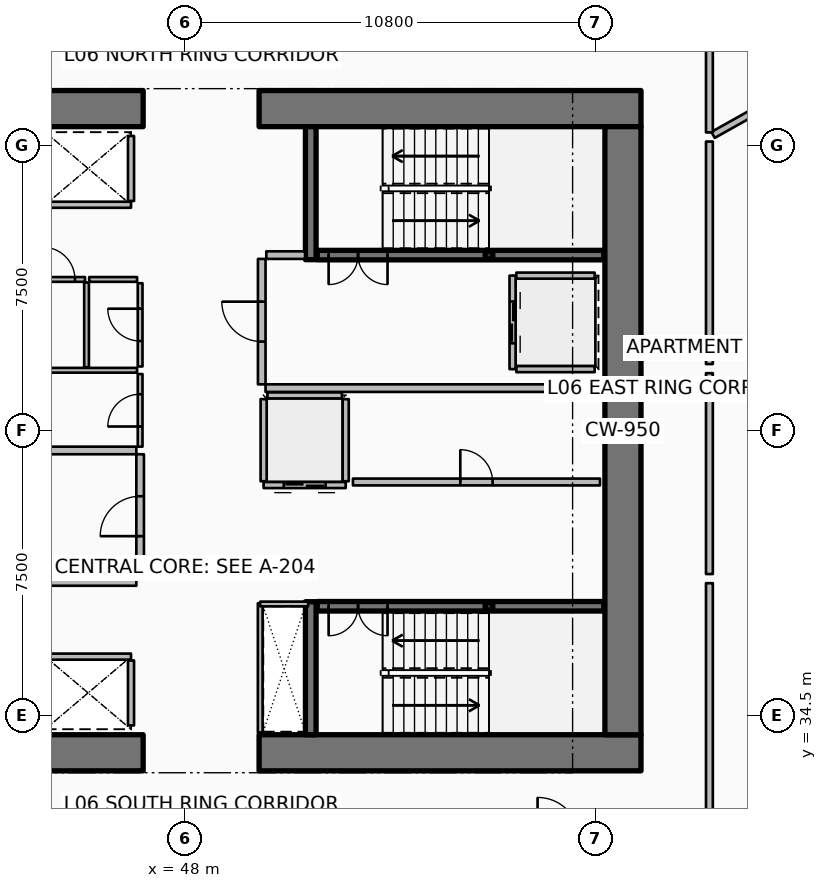
"""IFC4 building model, lengths in metres.
Left out: names, types, materials, properties, quantities, classifications, styles, units other than length and angle.
Written with IfcOpenShell. Run it as: python <this file> out.ifc"""

import sys

from ifc_helpers import new_model, si_unit, direction, frame, frame_2d, origin, origin_2d, place, context, subcontext, project, spatial, rectangle, hollow_rectangle, extrude, element, fill, save


model = new_model("IFC4")
c1 = context("Model", 3, precision=1e-05, world=origin(), true_north=direction((0.0, 1.0)))
c2 = subcontext(c1, "Body", "Model", "MODEL_VIEW")
j1 = project(units=[si_unit("LENGTHUNIT", "METRE"), si_unit("PLANEANGLEUNIT", "RADIAN")], contexts=[c1])
p1 = place(None, origin())
s1 = spatial("IfcSite", under=j1, at=p1, CompositionType="ELEMENT")
p2 = place(p1, origin())
s2 = spatial("IfcBuilding", under=s1, at=p2, CompositionType="ELEMENT")
p3 = place(p2, frame((0.0, 0.0, 30.15)))
s3 = spatial("IfcBuildingStorey", under=s2, at=p3, CompositionType="ELEMENT", Elevation=30.15)
p4 = place(p3, frame((36.85, 33.525, 0.0), z_axis=(0.0, 0.0, 1.0), x_axis=(1.0, 0.0, 0.0)))
e1 = element("IfcWall", 1, at=p4, inside=s3, PredefinedType="SHEAR", context=c2, shape_type="SweptSolid", body=[
    extrude(rectangle(XDim=10.05, YDim=0.95, at=frame_2d((5.025, 0.0))), origin(), (0.0, 0.0, 1.0), 3.75),
])
p5 = place(p3, frame((49.95, 33.525, 0.0), z_axis=(0.0, 0.0, 1.0), x_axis=(1.0, 0.0, 0.0)))
e2 = element("IfcWall", 2, at=p5, inside=s3, PredefinedType="SHEAR", context=c2, shape_type="SweptSolid", body=[
    extrude(rectangle(XDim=10.05, YDim=0.95, at=frame_2d((5.025, 0.0))), origin(), (0.0, 0.0, 1.0), 3.75),
])
p6 = place(p3, frame((36.85, 50.475, 0.0), z_axis=(0.0, 0.0, 1.0), x_axis=(1.0, 0.0, 0.0)))
e3 = element("IfcWall", 3, at=p6, inside=s3, PredefinedType="SHEAR", context=c2, shape_type="SweptSolid", body=[
    extrude(rectangle(XDim=10.05, YDim=0.95, at=frame_2d((5.025, 0.0))), origin(), (0.0, 0.0, 1.0), 3.75),
])
p7 = place(p3, frame((49.95, 50.475, 0.0), z_axis=(0.0, 0.0, 1.0), x_axis=(1.0, 0.0, 0.0)))
e4 = element("IfcWall", 4, at=p7, inside=s3, PredefinedType="SHEAR", context=c2, shape_type="SweptSolid", body=[
    extrude(rectangle(XDim=10.05, YDim=0.95, at=frame_2d((5.025, 0.0))), origin(), (0.0, 0.0, 1.0), 3.75),
])
p8 = place(p3, frame((59.525, 34.0, 0.0), z_axis=(0.0, 0.0, 1.0), x_axis=(0.0, 1.0, 0.0)))
e5 = element("IfcWall", 5, at=p8, inside=s3, PredefinedType="SHEAR", context=c2, shape_type="SweptSolid", body=[
    extrude(rectangle(XDim=16.0, YDim=0.95, at=frame_2d((8.0, 0.0))), origin(), (0.0, 0.0, 1.0), 3.75),
])
for number, where, z_axis, x_axis in (
    (6, (51.31, 46.5, 0.0), (0.0, 0.0, 1.0), (0.0, 1.0, 0.0)),
    (7, (51.31, 34.0, 0.0), (0.0, 0.0, 1.0), (0.0, 1.0, 0.0)),
):
    element("IfcWall", number, at=place(p3, frame(where, z_axis=z_axis, x_axis=x_axis)), inside=s3, PredefinedType="SHEAR", context=c2, shape_type="SweptSolid", body=[
        extrude(rectangle(XDim=3.5, YDim=0.28, at=frame_2d((1.75, 0.0))), origin(), (0.0, 0.0, 1.0), 3.75),
    ])
for number, where, z_axis, x_axis in (
    (8, (56.0, 46.62, 0.0), (0.0, 0.0, 1.0), (1.0, 0.0, 0.0)),
    (9, (56.0, 37.38, 0.0), (0.0, 0.0, 1.0), (1.0, 0.0, 0.0)),
):
    element("IfcColumn", number, at=place(p3, frame(where, z_axis=z_axis, x_axis=x_axis)), inside=s3, PredefinedType="COLUMN", context=c2, shape_type="SweptSolid", body=[
        extrude(hollow_rectangle(XDim=0.2, YDim=0.2, WallThickness=0.01, InnerFilletRadius=0.01, OuterFilletRadius=0.02, at=origin_2d()), origin(), (0.0, 0.0, 1.0), 1.67),
    ])
p9 = place(p3, frame((51.48, 46.62, 0.0), z_axis=(0.0, 0.0, 1.0), x_axis=(1.0, 0.0, 0.0)))
e10 = element("IfcWall", 10, at=p9, inside=s3, PredefinedType="SOLIDWALL", context=c2, shape_type="SweptSolid", body=[
    extrude(rectangle(XDim=7.54, YDim=0.25, at=frame_2d((3.77, 0.0))), origin(), (0.0, 0.0, 1.0), 3.5),
])
p10 = place(p9, frame((0.3, 0.0, 0.0)))
e11 = element("IfcOpeningElement", 11, at=p10, cuts=e10, PredefinedType="OPENING", context=c2, shape_type="SweptSolid", body=[
    extrude(rectangle(XDim=1.55, YDim=2.15, at=frame_2d((0.775, 1.075))), frame((0.0, 0.135, 0.0), z_axis=(0.0, -1.0, 0.0), x_axis=(1.0, 0.0, 0.0)), (0.0, 0.0, 1.0), 0.27),
])
p11 = place(p3, frame((51.48, 37.38, 0.0), z_axis=(0.0, 0.0, 1.0), x_axis=(1.0, 0.0, 0.0)))
e12 = element("IfcWall", 12, at=p11, inside=s3, PredefinedType="SOLIDWALL", context=c2, shape_type="SweptSolid", body=[
    extrude(rectangle(XDim=7.54, YDim=0.25, at=frame_2d((3.77, 0.0))), origin(), (0.0, 0.0, 1.0), 3.5),
])
p12 = place(p11, frame((0.3, 0.0, 0.0)))
e13 = element("IfcOpeningElement", 13, at=p12, cuts=e12, PredefinedType="OPENING", context=c2, shape_type="SweptSolid", body=[
    extrude(rectangle(XDim=1.55, YDim=2.15, at=frame_2d((0.775, 1.075))), frame((0.0, 0.135, 0.0), z_axis=(0.0, -1.0, 0.0), x_axis=(1.0, 0.0, 0.0)), (0.0, 0.0, 1.0), 0.27),
])
p13 = place(p3, frame((46.58, 47.945, 0.0), z_axis=(0.0, 0.0, 1.0), x_axis=(-1.0, 0.0, 0.0)))
e14 = element("IfcWall", 14, at=p13, inside=s3, PredefinedType="PARTITIONING", context=c2, shape_type="SweptSolid", body=[
    extrude(rectangle(XDim=2.26, YDim=0.16, at=frame_2d((1.13, 0.0))), origin(), (0.0, 0.0, 1.0), 3.5),
])
p14 = place(p3, frame((46.58, 48.045, 0.0), z_axis=(0.0, 0.0, 1.0), x_axis=(0.0, 1.0, 0.0)))
e15 = element("IfcWall", 15, at=p14, inside=s3, PredefinedType="PARTITIONING", context=c2, shape_type="SweptSolid", body=[
    extrude(rectangle(XDim=1.71, YDim=0.16, at=frame_2d((0.855, 0.0))), origin(), (0.0, 0.0, 1.0), 3.5),
])
p15 = place(p3, frame((44.32, 36.055, 0.0), z_axis=(0.0, 0.0, 1.0), x_axis=(1.0, 0.0, 0.0)))
e16 = element("IfcWall", 16, at=p15, inside=s3, PredefinedType="PARTITIONING", context=c2, shape_type="SweptSolid", body=[
    extrude(rectangle(XDim=2.26, YDim=0.16, at=frame_2d((1.13, 0.0))), origin(), (0.0, 0.0, 1.0), 3.5),
])
p16 = place(p3, frame((46.58, 34.245, 0.0), z_axis=(0.0, 0.0, 1.0), x_axis=(0.0, 1.0, 0.0)))
e17 = element("IfcWall", 17, at=p16, inside=s3, PredefinedType="PARTITIONING", context=c2, shape_type="SweptSolid", body=[
    extrude(rectangle(XDim=1.71, YDim=0.16, at=frame_2d((0.855, 0.0))), origin(), (0.0, 0.0, 1.0), 3.5),
])
p17 = place(p3, frame((56.62, 46.08, 0.0), z_axis=(0.0, 0.0, 1.0), x_axis=(0.0, -1.0, 0.0)))
e18 = element("IfcWall", 18, at=p17, inside=s3, PredefinedType="PARTITIONING", context=c2, shape_type="SweptSolid", body=[
    extrude(rectangle(XDim=2.46, YDim=0.16, at=frame_2d((1.23, 0.0))), origin(), (0.0, 0.0, 1.0), 3.5),
])
p18 = place(p17, frame((0.68, 0.0, 0.0)))
e19 = element("IfcOpeningElement", 19, at=p18, cuts=e18, PredefinedType="OPENING", context=c2, shape_type="SweptSolid", body=[
    extrude(rectangle(XDim=1.1, YDim=2.1, at=frame_2d((0.55, 1.05))), frame((0.0, 0.09, 0.0), z_axis=(0.0, -1.0, 0.0), x_axis=(1.0, 0.0, 0.0)), (0.0, 0.0, 1.0), 0.18),
])
for number, where, z_axis, x_axis in (
    (20, (56.72, 46.08, 0.0), (0.0, 0.0, 1.0), (1.0, 0.0, 0.0)),
    (21, (56.72, 43.62, 0.0), (0.0, 0.0, 1.0), (1.0, 0.0, 0.0)),
):
    element("IfcWall", number, at=place(p3, frame(where, z_axis=z_axis, x_axis=x_axis)), inside=s3, PredefinedType="PARTITIONING", context=c2, shape_type="SweptSolid", body=[
        extrude(rectangle(XDim=2.06, YDim=0.16, at=frame_2d((1.03, 0.0))), origin(), (0.0, 0.0, 1.0), 3.5),
    ])
p19 = place(p3, frame((52.23, 40.57, 0.0), z_axis=(0.0, 0.0, 1.0), x_axis=(-1.0, 0.0, 0.0)))
e22 = element("IfcWall", 22, at=p19, inside=s3, PredefinedType="PARTITIONING", context=c2, shape_type="SweptSolid", body=[
    extrude(rectangle(XDim=2.16, YDim=0.16, at=frame_2d((1.08, 0.0))), origin(), (0.0, 0.0, 1.0), 3.5),
])
p20 = place(p19, frame((0.53, 0.0, 0.0)))
e23 = element("IfcOpeningElement", 23, at=p20, cuts=e22, PredefinedType="OPENING", context=c2, shape_type="SweptSolid", body=[
    extrude(rectangle(XDim=1.1, YDim=2.1, at=frame_2d((0.55, 1.05))), frame((0.0, 0.09, 0.0), z_axis=(0.0, -1.0, 0.0), x_axis=(1.0, 0.0, 0.0)), (0.0, 0.0, 1.0), 0.18),
])
for number, where, z_axis, x_axis in (
    (24, (52.23, 40.67, 0.0), (0.0, 0.0, 1.0), (0.0, 1.0, 0.0)),
    (25, (50.07, 40.67, 0.0), (0.0, 0.0, 1.0), (0.0, 1.0, 0.0)),
):
    element("IfcWall", number, at=place(p3, frame(where, z_axis=z_axis, x_axis=x_axis)), inside=s3, PredefinedType="PARTITIONING", context=c2, shape_type="SweptSolid", body=[
        extrude(rectangle(XDim=2.16, YDim=0.16, at=frame_2d((1.08, 0.0))), origin(), (0.0, 0.0, 1.0), 3.5),
    ])
p21 = place(p3, frame((50.17, 42.93, 0.0), z_axis=(0.0, 0.0, 1.0), x_axis=(1.0, 0.0, 0.0)))
e26 = element("IfcWall", 26, at=p21, inside=s3, PredefinedType="PARTITIONING", context=c2, shape_type="SweptSolid", body=[
    extrude(rectangle(XDim=1.96, YDim=0.16, at=frame_2d((0.98, 0.0))), origin(), (0.0, 0.0, 1.0), 3.5),
])
p22 = place(p3, frame((52.42, 40.65, 0.0), z_axis=(0.0, 0.0, 1.0), x_axis=(1.0, 0.0, 0.0)))
e27 = element("IfcWall", 27, at=p22, inside=s3, PredefinedType="PARTITIONING", context=c2, shape_type="SweptSolid", body=[
    extrude(rectangle(XDim=6.5, YDim=0.18, at=frame_2d((3.25, 0.0))), origin(), (0.0, 0.0, 1.0), 3.5),
])
p23 = place(p22, frame((2.825, 0.0, 0.0)))
e28 = element("IfcOpeningElement", 28, at=p23, cuts=e27, PredefinedType="OPENING", context=c2, shape_type="SweptSolid", body=[
    extrude(rectangle(XDim=0.85, YDim=2.06, at=frame_2d((0.425, 1.03))), frame((0.0, 0.1, 0.0), z_axis=(0.0, -1.0, 0.0), x_axis=(1.0, 0.0, 0.0)), (0.0, 0.0, 1.0), 0.2),
])
p24 = place(p3, frame((41.35, 38.02, 0.0), z_axis=(0.0, 0.0, 1.0), x_axis=(1.0, 0.0, 0.0)))
e29 = element("IfcWall", 29, at=p24, inside=s3, PredefinedType="PARTITIONING", context=c2, shape_type="SweptSolid", body=[
    extrude(rectangle(XDim=5.37, YDim=0.2, at=frame_2d((2.685, 0.0))), origin(), (0.0, 0.0, 1.0), 3.5),
])
p25 = place(p3, frame((43.92, 41.48, 0.0), z_axis=(0.0, 0.0, 1.0), x_axis=(1.0, 0.0, 0.0)))
e30 = element("IfcWall", 30, at=p25, inside=s3, PredefinedType="PARTITIONING", context=c2, shape_type="SweptSolid", body=[
    extrude(rectangle(XDim=2.8, YDim=0.2, at=frame_2d((1.4, 0.0))), origin(), (0.0, 0.0, 1.0), 3.5),
])
p26 = place(p3, frame((46.82, 38.12, 0.0), z_axis=(0.0, 0.0, 1.0), x_axis=(0.0, 1.0, 0.0)))
e31 = element("IfcWall", 31, at=p26, inside=s3, PredefinedType="PARTITIONING", context=c2, shape_type="SweptSolid", body=[
    extrude(rectangle(XDim=3.26, YDim=0.2, at=frame_2d((1.63, 0.0))), origin(), (0.0, 0.0, 1.0), 3.5),
])
p27 = place(p26, frame((1.105, 0.0, 0.0)))
e32 = element("IfcOpeningElement", 32, at=p27, cuts=e31, PredefinedType="OPENING", context=c2, shape_type="SweptSolid", body=[
    extrude(rectangle(XDim=1.05, YDim=2.1, at=frame_2d((0.525, 1.05))), frame((0.0, 0.11, 0.0), z_axis=(0.0, -1.0, 0.0), x_axis=(1.0, 0.0, 0.0)), (0.0, 0.0, 1.0), 0.22),
])
p28 = place(p3, frame((50.12, 43.12, 0.0), z_axis=(0.0, 0.0, 1.0), x_axis=(1.0, 0.0, 0.0)))
e33 = element("IfcWall", 33, at=p28, inside=s3, PredefinedType="PARTITIONING", context=c2, shape_type="SweptSolid", body=[
    extrude(rectangle(XDim=8.88, YDim=0.2, at=frame_2d((4.44, 0.0))), origin(), (0.0, 0.0, 1.0), 3.5),
])
p29 = place(p3, frame((50.14, 46.62, 0.0), z_axis=(0.0, 0.0, 1.0), x_axis=(1.0, 0.0, 0.0)))
e34 = element("IfcWall", 34, at=p29, inside=s3, PredefinedType="PARTITIONING", context=c2, shape_type="SweptSolid", body=[
    extrude(rectangle(XDim=1.02, YDim=0.2, at=frame_2d((0.51, 0.0))), origin(), (0.0, 0.0, 1.0), 3.5),
])
p30 = place(p3, frame((50.02, 43.22, 0.0), z_axis=(0.0, 0.0, 1.0), x_axis=(0.0, 1.0, 0.0)))
e35 = element("IfcWall", 35, at=p30, inside=s3, PredefinedType="PARTITIONING", context=c2, shape_type="SweptSolid", body=[
    extrude(rectangle(XDim=3.3, YDim=0.2, at=frame_2d((1.65, 0.0))), origin(), (0.0, 0.0, 1.0), 3.5),
])
p31 = place(p30, frame((1.125, 0.0, 0.0)))
e36 = element("IfcOpeningElement", 36, at=p31, cuts=e35, PredefinedType="OPENING", context=c2, shape_type="SweptSolid", body=[
    extrude(rectangle(XDim=1.05, YDim=2.1, at=frame_2d((0.525, 1.05))), frame((0.0, 0.11, 0.0), z_axis=(0.0, -1.0, 0.0), x_axis=(1.0, 0.0, 0.0)), (0.0, 0.0, 1.0), 0.22),
])
p32 = place(p3, frame((49.98, 34.06, 0.0), z_axis=(0.0, 0.0, 1.0), x_axis=(0.0, 1.0, 0.0)))
e37 = element("IfcWall", 37, at=p32, inside=s3, PredefinedType="PARTITIONING", context=c2, shape_type="SweptSolid", body=[
    extrude(rectangle(XDim=3.4, YDim=0.125, at=frame_2d((1.7, 0.0))), origin(), (0.0, 0.0, 1.0), 2.94),
])
p33 = place(p3, frame((49.98, 37.44, 0.0), z_axis=(0.0, 0.0, 1.0), x_axis=(1.0, 0.0, 0.0)))
e38 = element("IfcWall", 38, at=p33, inside=s3, PredefinedType="PARTITIONING", context=c2, shape_type="SweptSolid", body=[
    extrude(rectangle(XDim=1.26, YDim=0.125, at=frame_2d((0.63, 0.0))), origin(), (0.0, 0.0, 1.0), 2.94),
])
p34 = place(p3, frame((44.03, 43.59, 0.0), z_axis=(0.0, 0.0, 1.0), x_axis=(1.0, 0.0, 0.0)))
e39 = element("IfcWall", 39, at=p34, inside=s3, PredefinedType="PARTITIONING", context=c2, shape_type="SweptSolid", body=[
    extrude(rectangle(XDim=2.71, YDim=0.125, at=frame_2d((1.355, 0.0))), origin(), (0.0, 0.0, 1.0), 2.94),
])
p35 = place(p3, frame((45.41, 43.67, 0.0), z_axis=(0.0, 0.0, 1.0), x_axis=(0.0, 1.0, 0.0)))
e40 = element("IfcWall", 40, at=p35, inside=s3, PredefinedType="PARTITIONING", context=c2, shape_type="SweptSolid", body=[
    extrude(rectangle(XDim=2.23, YDim=0.125, at=frame_2d((1.115, 0.0))), origin(), (0.0, 0.0, 1.0), 2.94),
])
p36 = place(p3, frame((46.82, 41.58, 0.0), z_axis=(0.0, 0.0, 1.0), x_axis=(0.0, 1.0, 0.0)))
e41 = element("IfcWall", 41, at=p36, inside=s3, PredefinedType="PARTITIONING", context=c2, shape_type="SweptSolid", body=[
    extrude(rectangle(XDim=1.91, YDim=0.125, at=frame_2d((0.955, 0.0))), origin(), (0.0, 0.0, 1.0), 2.94),
])
p37 = place(p36, frame((0.53, 0.0, 0.0)))
e42 = element("IfcOpeningElement", 42, at=p37, cuts=e41, PredefinedType="OPENING", context=c2, shape_type="SweptSolid", body=[
    extrude(rectangle(XDim=0.85, YDim=2.06, at=frame_2d((0.425, 1.03))), frame((0.0, 0.073, 0.0), z_axis=(0.0, -1.0, 0.0), x_axis=(1.0, 0.0, 0.0)), (0.0, 0.0, 1.0), 0.145),
])
p38 = place(p3, frame((46.82, 43.69, 0.0), z_axis=(0.0, 0.0, 1.0), x_axis=(0.0, 1.0, 0.0)))
e43 = element("IfcWall", 43, at=p38, inside=s3, PredefinedType="PARTITIONING", context=c2, shape_type="SweptSolid", body=[
    extrude(rectangle(XDim=2.19, YDim=0.125, at=frame_2d((1.095, 0.0))), origin(), (0.0, 0.0, 1.0), 2.94),
])
p39 = place(p38, frame((0.67, 0.0, 0.0)))
e44 = element("IfcOpeningElement", 44, at=p39, cuts=e43, PredefinedType="OPENING", context=c2, shape_type="SweptSolid", body=[
    extrude(rectangle(XDim=0.85, YDim=2.06, at=frame_2d((0.425, 1.03))), frame((0.0, 0.073, 0.0), z_axis=(0.0, -1.0, 0.0), x_axis=(1.0, 0.0, 0.0)), (0.0, 0.0, 1.0), 0.145),
])
p40 = place(p3, frame((43.99, 45.98, 0.0), z_axis=(0.0, 0.0, 1.0), x_axis=(1.0, 0.0, 0.0)))
e45 = element("IfcWall", 45, at=p40, inside=s3, PredefinedType="PARTITIONING", context=c2, shape_type="SweptSolid", body=[
    extrude(rectangle(XDim=1.38, YDim=0.125, at=frame_2d((0.69, 0.0))), origin(), (0.0, 0.0, 1.0), 2.94),
])
p41 = place(p40, frame((0.265, 0.0, 0.0)))
e46 = element("IfcOpeningElement", 46, at=p41, cuts=e45, PredefinedType="OPENING", context=c2, shape_type="SweptSolid", body=[
    extrude(rectangle(XDim=0.85, YDim=2.06, at=frame_2d((0.425, 1.03))), frame((0.0, 0.073, 0.0), z_axis=(0.0, -1.0, 0.0), x_axis=(1.0, 0.0, 0.0)), (0.0, 0.0, 1.0), 0.145),
])
p42 = place(p3, frame((45.48, 45.98, 0.0), z_axis=(0.0, 0.0, 1.0), x_axis=(1.0, 0.0, 0.0)))
e47 = element("IfcWall", 47, at=p42, inside=s3, PredefinedType="PARTITIONING", context=c2, shape_type="SweptSolid", body=[
    extrude(rectangle(XDim=1.26, YDim=0.125, at=frame_2d((0.63, 0.0))), origin(), (0.0, 0.0, 1.0), 2.94),
])
p43 = place(p3, frame((61.896, 49.782, 0.0), z_axis=(0.0, 0.0, 1.0), x_axis=(0.872493215695, 0.488626225828, 0.0)))
e48 = element("IfcWall", 48, at=p43, inside=s3, PredefinedType="PARTITIONING", context=c2, shape_type="SweptSolid", body=[
    extrude(rectangle(XDim=15.612, YDim=0.18, at=frame_2d((7.806, 0.0))), origin(), (0.0, 0.0, 1.0), 2.867),
])
p44 = place(p3, frame((61.8, 49.848, 0.0), z_axis=(0.0, 0.0, 1.0), x_axis=(0.0, 1.0, 0.0)))
e49 = element("IfcWall", 49, at=p44, inside=s3, PredefinedType="PARTITIONING", context=c2, shape_type="SweptSolid", body=[
    extrude(rectangle(XDim=2.781, YDim=0.18, at=frame_2d((1.391, 0.0))), origin(), (0.0, 0.0, 1.0), 2.867),
])
p45 = place(p3, frame((61.8, 31.37, 0.0), z_axis=(0.0, 0.0, 1.0), x_axis=(0.0, 1.0, 0.0)))
e50 = element("IfcWall", 50, at=p45, inside=s3, PredefinedType="PARTITIONING", context=c2, shape_type="SweptSolid", body=[
    extrude(rectangle(XDim=6.618, YDim=0.18, at=frame_2d((3.309, 0.0))), origin(), (0.0, 0.0, 1.0), 2.867),
])
p46 = place(p3, frame((61.8, 38.228, 0.0), z_axis=(0.0, 0.0, 1.0), x_axis=(0.0, 1.0, 0.0)))
e51 = element("IfcWall", 51, at=p46, inside=s3, PredefinedType="PARTITIONING", context=c2, shape_type="SweptSolid", body=[
    extrude(rectangle(XDim=5.285, YDim=0.18, at=frame_2d((2.643, 0.0))), origin(), (0.0, 0.0, 1.0), 2.867),
])
p47 = place(p3, frame((61.8, 43.753, 0.0), z_axis=(0.0, 0.0, 1.0), x_axis=(0.0, 1.0, 0.0)))
e52 = element("IfcWall", 52, at=p47, inside=s3, PredefinedType="PARTITIONING", context=c2, shape_type="SweptSolid", body=[
    extrude(rectangle(XDim=5.855, YDim=0.18, at=frame_2d((2.927, 0.0))), origin(), (0.0, 0.0, 1.0), 2.867),
])
p48 = place(p10, origin())
e53 = element("IfcDoor", 53, at=p48, inside=s3, OperationType="DOUBLE_DOOR_SINGLE_SWING", PredefinedType="DOOR", context=c2, shape_type="SweptSolid", body=[
    extrude(rectangle(XDim=1.55, YDim=2.15, at=frame_2d((0.775, 1.075))), frame((0.0, 0.025, 0.0), z_axis=(0.0, -1.0, 0.0), x_axis=(1.0, 0.0, 0.0)), (0.0, 0.0, 1.0), 0.05),
])
fill(e11, e53)
p49 = place(p12, origin())
e54 = element("IfcDoor", 54, at=p49, inside=s3, OperationType="DOUBLE_DOOR_SINGLE_SWING", PredefinedType="DOOR", context=c2, shape_type="SweptSolid", body=[
    extrude(rectangle(XDim=1.55, YDim=2.15, at=frame_2d((0.775, 1.075))), frame((0.0, 0.025, 0.0), z_axis=(0.0, -1.0, 0.0), x_axis=(1.0, 0.0, 0.0)), (0.0, 0.0, 1.0), 0.05),
])
fill(e13, e54)
p50 = place(p18, origin())
e55 = element("IfcDoor", 55, at=p50, inside=s3, OperationType="DOUBLE_DOOR_SLIDING", PredefinedType="DOOR", context=c2, shape_type="SweptSolid", body=[
    extrude(rectangle(XDim=1.1, YDim=2.1, at=frame_2d((0.55, 1.05))), frame((0.0, 0.025, 0.0), z_axis=(0.0, -1.0, 0.0), x_axis=(1.0, 0.0, 0.0)), (0.0, 0.0, 1.0), 0.05),
])
fill(e19, e55)
p51 = place(p20, origin())
e56 = element("IfcDoor", 56, at=p51, inside=s3, OperationType="DOUBLE_DOOR_SLIDING", PredefinedType="DOOR", context=c2, shape_type="SweptSolid", body=[
    extrude(rectangle(XDim=1.1, YDim=2.1, at=frame_2d((0.55, 1.05))), frame((0.0, 0.025, 0.0), z_axis=(0.0, -1.0, 0.0), x_axis=(1.0, 0.0, 0.0)), (0.0, 0.0, 1.0), 0.05),
])
fill(e23, e56)
p52 = place(p23, origin())
e57 = element("IfcDoor", 57, at=p52, inside=s3, OperationType="SINGLE_SWING_LEFT", PredefinedType="DOOR", context=c2, shape_type="SweptSolid", body=[
    extrude(rectangle(XDim=0.85, YDim=2.06, at=frame_2d((0.425, 1.03))), frame((0.0, 0.025, 0.0), z_axis=(0.0, -1.0, 0.0), x_axis=(1.0, 0.0, 0.0)), (0.0, 0.0, 1.0), 0.05),
])
fill(e28, e57)
p53 = place(p27, origin())
e58 = element("IfcDoor", 58, at=p53, inside=s3, OperationType="SINGLE_SWING_LEFT", PredefinedType="DOOR", context=c2, shape_type="SweptSolid", body=[
    extrude(rectangle(XDim=1.05, YDim=2.1, at=frame_2d((0.525, 1.05))), frame((0.0, 0.025, 0.0), z_axis=(0.0, -1.0, 0.0), x_axis=(1.0, 0.0, 0.0)), (0.0, 0.0, 1.0), 0.05),
])
fill(e32, e58)
p54 = place(p31, origin())
e59 = element("IfcDoor", 59, at=p54, inside=s3, OperationType="SINGLE_SWING_RIGHT", PredefinedType="DOOR", context=c2, shape_type="SweptSolid", body=[
    extrude(rectangle(XDim=1.05, YDim=2.1, at=frame_2d((0.525, 1.05))), frame((0.0, 0.025, 0.0), z_axis=(0.0, -1.0, 0.0), x_axis=(1.0, 0.0, 0.0)), (0.0, 0.0, 1.0), 0.05),
])
fill(e36, e59)
p55 = place(p37, origin())
e60 = element("IfcDoor", 60, at=p55, inside=s3, OperationType="SINGLE_SWING_LEFT", PredefinedType="DOOR", context=c2, shape_type="SweptSolid", body=[
    extrude(rectangle(XDim=0.85, YDim=2.06, at=frame_2d((0.425, 1.03))), frame((0.0, 0.025, 0.0), z_axis=(0.0, -1.0, 0.0), x_axis=(1.0, 0.0, 0.0)), (0.0, 0.0, 1.0), 0.05),
])
fill(e42, e60)
p56 = place(p39, origin())
e61 = element("IfcDoor", 61, at=p56, inside=s3, OperationType="SINGLE_SWING_RIGHT", PredefinedType="DOOR", context=c2, shape_type="SweptSolid", body=[
    extrude(rectangle(XDim=0.85, YDim=2.06, at=frame_2d((0.425, 1.03))), frame((0.0, 0.025, 0.0), z_axis=(0.0, -1.0, 0.0), x_axis=(1.0, 0.0, 0.0)), (0.0, 0.0, 1.0), 0.05),
])
fill(e44, e61)
p57 = place(p41, origin())
e62 = element("IfcDoor", 62, at=p57, inside=s3, OperationType="SINGLE_SWING_LEFT", PredefinedType="DOOR", context=c2, shape_type="SweptSolid", body=[
    extrude(rectangle(XDim=0.85, YDim=2.06, at=frame_2d((0.425, 1.03))), frame((0.0, 0.025, 0.0), z_axis=(0.0, -1.0, 0.0), x_axis=(1.0, 0.0, 0.0)), (0.0, 0.0, 1.0), 0.05),
])
fill(e46, e62)
save(model, sys.argv[1])
